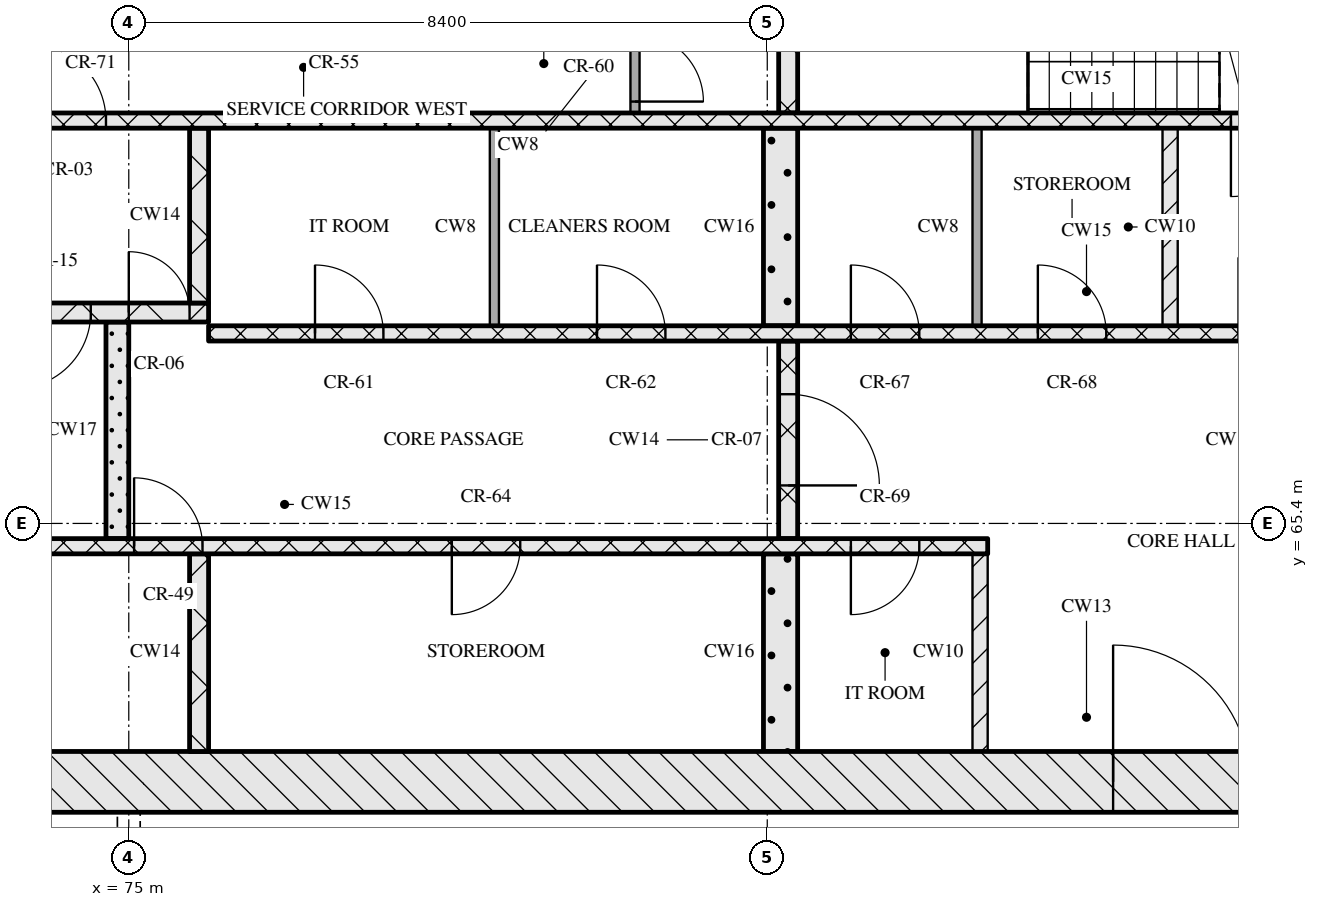
"""IFC4 building model, lengths in metres.
Left out: names, types, materials, properties, quantities, classifications, styles, units other than length and angle.
Written with IfcOpenShell. Run it as: python <this file> out.ifc"""

import sys

from ifc_helpers import new_model, si_unit, direction, frame, frame_2d, origin, place, context, subcontext, project, spatial, rectangle, extrude, element, fill, save


model = new_model("IFC4")
c1 = context("Model", 3, precision=1e-05, world=origin(), true_north=direction((0.0, 1.0)))
c2 = subcontext(c1, "Body", "Model", "MODEL_VIEW")
j1 = project(units=[si_unit("LENGTHUNIT", "METRE"), si_unit("PLANEANGLEUNIT", "RADIAN")], contexts=[c1])
p1 = place(None, origin())
s1 = spatial("IfcSite", under=j1, at=p1, CompositionType="ELEMENT")
p2 = place(p1, origin())
s2 = spatial("IfcBuilding", under=s1, at=p2, CompositionType="ELEMENT")
p3 = place(p2, frame((0.0, 0.0, 151.05)))
s3 = spatial("IfcBuildingStorey", under=s2, at=p3, CompositionType="ELEMENT", Elevation=151.05)
p4 = place(p3, frame((67.0, 62.0, 0.0), z_axis=(0.0, 0.0, 1.0), x_axis=(1.0, 0.0, 0.0)))
e1 = element("IfcWall", 1, at=p4, inside=s3, PredefinedType="SOLIDWALL", context=c2, shape_type="SweptSolid", body=[
    extrude(rectangle(XDim=41.2, YDim=0.8, at=frame_2d((20.6, 0.0))), origin(), (0.0, 0.0, 1.0), 3.32),
])
p5 = place(p4, frame((20.95, 0.0, 0.0)))
e2 = element("IfcOpeningElement", 2, at=p5, cuts=e1, PredefinedType="OPENING", context=c2, shape_type="SweptSolid", body=[
    extrude(rectangle(XDim=1.8, YDim=2.1, at=frame_2d((0.9, 1.05))), frame((0.0, 0.41, 0.0), z_axis=(0.0, -1.0, 0.0), x_axis=(1.0, 0.0, 0.0)), (0.0, 0.0, 1.0), 0.82),
])
p6 = place(p3, frame((75.925, 62.4, 0.0), z_axis=(0.0, 0.0, 1.0), x_axis=(0.0, 1.0, 0.0)))
e3 = element("IfcWall", 3, at=p6, inside=s3, PredefinedType="SOLIDWALL", context=c2, shape_type="SweptSolid", body=[
    extrude(rectangle(XDim=2.6, YDim=0.25, at=frame_2d((1.3, 0.0))), origin(), (0.0, 0.0, 1.0), 3.32),
])
p7 = place(p3, frame((83.575, 62.4, 0.0), z_axis=(0.0, 0.0, 1.0), x_axis=(0.0, 1.0, 0.0)))
e4 = element("IfcWall", 4, at=p7, inside=s3, PredefinedType="SOLIDWALL", context=c2, shape_type="SweptSolid", body=[
    extrude(rectangle(XDim=2.6, YDim=0.45, at=frame_2d((1.3, 0.0))), origin(), (0.0, 0.0, 1.0), 3.32),
])
p8 = place(p3, frame((86.2, 62.4, 0.0), z_axis=(0.0, 0.0, 1.0), x_axis=(0.0, 1.0, 0.0)))
e5 = element("IfcWall", 5, at=p8, inside=s3, PredefinedType="PARTITIONING", context=c2, shape_type="SweptSolid", body=[
    extrude(rectangle(XDim=2.6, YDim=0.2, at=frame_2d((1.3, 0.0))), origin(), (0.0, 0.0, 1.0), 3.32),
])
p9 = place(p3, frame((67.8, 65.1, 0.0), z_axis=(0.0, 0.0, 1.0), x_axis=(1.0, 0.0, 0.0)))
e6 = element("IfcWall", 6, at=p9, inside=s3, PredefinedType="SOLIDWALL", context=c2, shape_type="SweptSolid", body=[
    extrude(rectangle(XDim=18.5, YDim=0.2, at=frame_2d((9.25, 0.0))), origin(), (0.0, 0.0, 1.0), 3.32),
])
p10 = place(p9, frame((7.27, 0.0, 0.0)))
e7 = element("IfcOpeningElement", 7, at=p10, cuts=e6, PredefinedType="OPENING", context=c2, shape_type="SweptSolid", body=[
    extrude(rectangle(XDim=0.9, YDim=2.1, at=frame_2d((0.45, 1.05))), frame((0.0, 0.11, 0.0), z_axis=(0.0, -1.0, 0.0), x_axis=(1.0, 0.0, 0.0)), (0.0, 0.0, 1.0), 0.22),
])
p11 = place(p9, frame((11.45, 0.0, 0.0)))
e8 = element("IfcOpeningElement", 8, at=p11, cuts=e6, PredefinedType="OPENING", context=c2, shape_type="SweptSolid", body=[
    extrude(rectangle(XDim=0.9, YDim=2.1, at=frame_2d((0.45, 1.05))), frame((0.0, 0.11, 0.0), z_axis=(0.0, -1.0, 0.0), x_axis=(1.0, 0.0, 0.0)), (0.0, 0.0, 1.0), 0.22),
])
p12 = place(p9, frame((16.7, 0.0, 0.0)))
e9 = element("IfcOpeningElement", 9, at=p12, cuts=e6, PredefinedType="OPENING", context=c2, shape_type="SweptSolid", body=[
    extrude(rectangle(XDim=0.9, YDim=2.1, at=frame_2d((0.45, 1.05))), frame((0.0, 0.11, 0.0), z_axis=(0.0, -1.0, 0.0), x_axis=(1.0, 0.0, 0.0)), (0.0, 0.0, 1.0), 0.22),
])
p13 = place(p3, frame((74.85, 65.2, 0.0), z_axis=(0.0, 0.0, 1.0), x_axis=(0.0, 1.0, 0.0)))
e10 = element("IfcWall", 10, at=p13, inside=s3, PredefinedType="SOLIDWALL", context=c2, shape_type="SweptSolid", body=[
    extrude(rectangle(XDim=2.85, YDim=0.3, at=frame_2d((1.425, 0.0))), origin(), (0.0, 0.0, 1.0), 3.32),
])
p14 = place(p3, frame((83.675, 65.2, 0.0), z_axis=(0.0, 0.0, 1.0), x_axis=(0.0, 1.0, 0.0)))
e11 = element("IfcWall", 11, at=p14, inside=s3, PredefinedType="SOLIDWALL", context=c2, shape_type="SweptSolid", body=[
    extrude(rectangle(XDim=2.6, YDim=0.25, at=frame_2d((1.3, 0.0))), origin(), (0.0, 0.0, 1.0), 3.32),
])
p15 = place(p14, frame((0.7, 0.0, 0.0)))
e12 = element("IfcOpeningElement", 12, at=p15, cuts=e11, PredefinedType="OPENING", context=c2, shape_type="SweptSolid", body=[
    extrude(rectangle(XDim=1.2, YDim=2.1, at=frame_2d((0.6, 1.05))), frame((0.0, 0.135, 0.0), z_axis=(0.0, -1.0, 0.0), x_axis=(1.0, 0.0, 0.0)), (0.0, 0.0, 1.0), 0.27),
])
p16 = place(p3, frame((76.05, 67.9, 0.0), z_axis=(0.0, 0.0, 1.0), x_axis=(1.0, 0.0, 0.0)))
e13 = element("IfcWall", 13, at=p16, inside=s3, PredefinedType="SOLIDWALL", context=c2, shape_type="SweptSolid", body=[
    extrude(rectangle(XDim=23.1, YDim=0.2, at=frame_2d((11.55, 0.0))), origin(), (0.0, 0.0, 1.0), 3.32),
])
p17 = place(p16, frame((1.4, 0.0, 0.0)))
e14 = element("IfcOpeningElement", 14, at=p17, cuts=e13, PredefinedType="OPENING", context=c2, shape_type="SweptSolid", body=[
    extrude(rectangle(XDim=0.9, YDim=2.1, at=frame_2d((0.45, 1.05))), frame((0.0, 0.11, 0.0), z_axis=(0.0, -1.0, 0.0), x_axis=(1.0, 0.0, 0.0)), (0.0, 0.0, 1.0), 0.22),
])
p18 = place(p16, frame((5.11, 0.0, 0.0)))
e15 = element("IfcOpeningElement", 15, at=p18, cuts=e13, PredefinedType="OPENING", context=c2, shape_type="SweptSolid", body=[
    extrude(rectangle(XDim=0.9, YDim=2.1, at=frame_2d((0.45, 1.05))), frame((0.0, 0.11, 0.0), z_axis=(0.0, -1.0, 0.0), x_axis=(1.0, 0.0, 0.0)), (0.0, 0.0, 1.0), 0.22),
])
p19 = place(p16, frame((8.45, 0.0, 0.0)))
e16 = element("IfcOpeningElement", 16, at=p19, cuts=e13, PredefinedType="OPENING", context=c2, shape_type="SweptSolid", body=[
    extrude(rectangle(XDim=0.9, YDim=2.1, at=frame_2d((0.45, 1.05))), frame((0.0, 0.11, 0.0), z_axis=(0.0, -1.0, 0.0), x_axis=(1.0, 0.0, 0.0)), (0.0, 0.0, 1.0), 0.22),
])
p20 = place(p16, frame((10.91, 0.0, 0.0)))
e17 = element("IfcOpeningElement", 17, at=p20, cuts=e13, PredefinedType="OPENING", context=c2, shape_type="SweptSolid", body=[
    extrude(rectangle(XDim=0.9, YDim=2.1, at=frame_2d((0.45, 1.05))), frame((0.0, 0.11, 0.0), z_axis=(0.0, -1.0, 0.0), x_axis=(1.0, 0.0, 0.0)), (0.0, 0.0, 1.0), 0.22),
])
p21 = place(p16, frame((13.55, 0.0, 0.0)))
e18 = element("IfcOpeningElement", 18, at=p21, cuts=e13, PredefinedType="OPENING", context=c2, shape_type="SweptSolid", body=[
    extrude(rectangle(XDim=1.0, YDim=2.1, at=frame_2d((0.5, 1.05))), frame((0.0, 0.11, 0.0), z_axis=(0.0, -1.0, 0.0), x_axis=(1.0, 0.0, 0.0)), (0.0, 0.0, 1.0), 0.22),
])
p22 = place(p16, frame((16.2, 0.0, 0.0)))
e19 = element("IfcOpeningElement", 19, at=p22, cuts=e13, PredefinedType="OPENING", context=c2, shape_type="SweptSolid", body=[
    extrude(rectangle(XDim=1.1, YDim=2.1, at=frame_2d((0.55, 1.05))), frame((0.0, 0.11, 0.0), z_axis=(0.0, -1.0, 0.0), x_axis=(1.0, 0.0, 0.0)), (0.0, 0.0, 1.0), 0.22),
])
p23 = place(p16, frame((18.7, 0.0, 0.0)))
e20 = element("IfcOpeningElement", 20, at=p23, cuts=e13, PredefinedType="OPENING", context=c2, shape_type="SweptSolid", body=[
    extrude(rectangle(XDim=1.1, YDim=2.1, at=frame_2d((0.55, 1.05))), frame((0.0, 0.11, 0.0), z_axis=(0.0, -1.0, 0.0), x_axis=(1.0, 0.0, 0.0)), (0.0, 0.0, 1.0), 0.22),
])
p24 = place(p16, frame((21.2, 0.0, 0.0)))
e21 = element("IfcOpeningElement", 21, at=p24, cuts=e13, PredefinedType="OPENING", context=c2, shape_type="SweptSolid", body=[
    extrude(rectangle(XDim=1.1, YDim=2.1, at=frame_2d((0.55, 1.05))), frame((0.0, 0.11, 0.0), z_axis=(0.0, -1.0, 0.0), x_axis=(1.0, 0.0, 0.0)), (0.0, 0.0, 1.0), 0.22),
])
p25 = place(p3, frame((79.81, 68.0, 0.0), z_axis=(0.0, 0.0, 1.0), x_axis=(0.0, 1.0, 0.0)))
e22 = element("IfcWall", 22, at=p25, inside=s3, PredefinedType="PARTITIONING", context=c2, shape_type="SweptSolid", body=[
    extrude(rectangle(XDim=2.6, YDim=0.12, at=frame_2d((1.3, 0.0))), origin(), (0.0, 0.0, 1.0), 3.32),
])
p26 = place(p3, frame((83.575, 68.0, 0.0), z_axis=(0.0, 0.0, 1.0), x_axis=(0.0, 1.0, 0.0)))
e23 = element("IfcWall", 23, at=p26, inside=s3, PredefinedType="SOLIDWALL", context=c2, shape_type="SweptSolid", body=[
    extrude(rectangle(XDim=2.6, YDim=0.45, at=frame_2d((1.3, 0.0))), origin(), (0.0, 0.0, 1.0), 3.32),
])
p27 = place(p3, frame((86.16, 68.0, 0.0), z_axis=(0.0, 0.0, 1.0), x_axis=(0.0, 1.0, 0.0)))
e24 = element("IfcWall", 24, at=p27, inside=s3, PredefinedType="PARTITIONING", context=c2, shape_type="SweptSolid", body=[
    extrude(rectangle(XDim=2.6, YDim=0.12, at=frame_2d((1.3, 0.0))), origin(), (0.0, 0.0, 1.0), 3.32),
])
p28 = place(p3, frame((88.7, 68.0, 0.0), z_axis=(0.0, 0.0, 1.0), x_axis=(0.0, 1.0, 0.0)))
e25 = element("IfcWall", 25, at=p28, inside=s3, PredefinedType="PARTITIONING", context=c2, shape_type="SweptSolid", body=[
    extrude(rectangle(XDim=2.6, YDim=0.2, at=frame_2d((1.3, 0.0))), origin(), (0.0, 0.0, 1.0), 3.32),
])
p29 = place(p3, frame((67.8, 68.175, 0.0), z_axis=(0.0, 0.0, 1.0), x_axis=(1.0, 0.0, 0.0)))
e26 = element("IfcWall", 26, at=p29, inside=s3, PredefinedType="SOLIDWALL", context=c2, shape_type="SweptSolid", body=[
    extrude(rectangle(XDim=8.25, YDim=0.25, at=frame_2d((4.125, 0.0))), origin(), (0.0, 0.0, 1.0), 3.32),
])
p30 = place(p29, frame((5.7, 0.0, 0.0)))
e27 = element("IfcOpeningElement", 27, at=p30, cuts=e26, PredefinedType="OPENING", context=c2, shape_type="SweptSolid", body=[
    extrude(rectangle(XDim=1.0, YDim=2.1, at=frame_2d((0.5, 1.05))), frame((0.0, 0.135, 0.0), z_axis=(0.0, -1.0, 0.0), x_axis=(1.0, 0.0, 0.0)), (0.0, 0.0, 1.0), 0.27),
])
p31 = place(p29, frame((7.2, 0.0, 0.0)))
e28 = element("IfcOpeningElement", 28, at=p31, cuts=e26, PredefinedType="OPENING", context=c2, shape_type="SweptSolid", body=[
    extrude(rectangle(XDim=0.8, YDim=2.1, at=frame_2d((0.4, 1.05))), frame((0.0, 0.135, 0.0), z_axis=(0.0, -1.0, 0.0), x_axis=(1.0, 0.0, 0.0)), (0.0, 0.0, 1.0), 0.27),
])
p32 = place(p3, frame((75.925, 68.3, 0.0), z_axis=(0.0, 0.0, 1.0), x_axis=(0.0, 1.0, 0.0)))
e29 = element("IfcWall", 29, at=p32, inside=s3, PredefinedType="SOLIDWALL", context=c2, shape_type="SweptSolid", body=[
    extrude(rectangle(XDim=2.3, YDim=0.25, at=frame_2d((1.15, 0.0))), origin(), (0.0, 0.0, 1.0), 3.32),
])
p33 = place(p3, frame((67.8, 70.7, 0.0), z_axis=(0.0, 0.0, 1.0), x_axis=(1.0, 0.0, 0.0)))
e30 = element("IfcWall", 30, at=p33, inside=s3, PredefinedType="SOLIDWALL", context=c2, shape_type="SweptSolid", body=[
    extrude(rectangle(XDim=39.6, YDim=0.2, at=frame_2d((19.8, 0.0))), origin(), (0.0, 0.0, 1.0), 3.32),
])
p34 = place(p33, frame((0.65, 0.0, 0.0)))
e31 = element("IfcOpeningElement", 31, at=p34, cuts=e30, PredefinedType="OPENING", context=c2, shape_type="SweptSolid", body=[
    extrude(rectangle(XDim=1.1, YDim=2.1, at=frame_2d((0.55, 1.05))), frame((0.0, 0.11, 0.0), z_axis=(0.0, -1.0, 0.0), x_axis=(1.0, 0.0, 0.0)), (0.0, 0.0, 1.0), 0.22),
])
p35 = place(p33, frame((3.25, 0.0, 0.0)))
e32 = element("IfcOpeningElement", 32, at=p35, cuts=e30, PredefinedType="OPENING", context=c2, shape_type="SweptSolid", body=[
    extrude(rectangle(XDim=1.1, YDim=2.1, at=frame_2d((0.55, 1.05))), frame((0.0, 0.11, 0.0), z_axis=(0.0, -1.0, 0.0), x_axis=(1.0, 0.0, 0.0)), (0.0, 0.0, 1.0), 0.22),
])
p36 = place(p33, frame((5.9, 0.0, 0.0)))
e33 = element("IfcOpeningElement", 33, at=p36, cuts=e30, PredefinedType="OPENING", context=c2, shape_type="SweptSolid", body=[
    extrude(rectangle(XDim=1.0, YDim=2.1, at=frame_2d((0.5, 1.05))), frame((0.0, 0.11, 0.0), z_axis=(0.0, -1.0, 0.0), x_axis=(1.0, 0.0, 0.0)), (0.0, 0.0, 1.0), 0.22),
])
p37 = place(p33, frame((21.7, 0.0, 0.0)))
e34 = element("IfcOpeningElement", 34, at=p37, cuts=e30, PredefinedType="OPENING", context=c2, shape_type="SweptSolid", body=[
    extrude(rectangle(XDim=1.0, YDim=2.1, at=frame_2d((0.5, 1.05))), frame((0.0, 0.11, 0.0), z_axis=(0.0, -1.0, 0.0), x_axis=(1.0, 0.0, 0.0)), (0.0, 0.0, 1.0), 0.22),
])
p38 = place(p33, frame((32.7, 0.0, 0.0)))
e35 = element("IfcOpeningElement", 35, at=p38, cuts=e30, PredefinedType="OPENING", context=c2, shape_type="SweptSolid", body=[
    extrude(rectangle(XDim=1.0, YDim=2.1, at=frame_2d((0.5, 1.05))), frame((0.0, 0.11, 0.0), z_axis=(0.0, -1.0, 0.0), x_axis=(1.0, 0.0, 0.0)), (0.0, 0.0, 1.0), 0.22),
])
p39 = place(p33, frame((35.25, 0.0, 0.0)))
e36 = element("IfcOpeningElement", 36, at=p39, cuts=e30, PredefinedType="OPENING", context=c2, shape_type="SweptSolid", body=[
    extrude(rectangle(XDim=1.1, YDim=2.1, at=frame_2d((0.55, 1.05))), frame((0.0, 0.11, 0.0), z_axis=(0.0, -1.0, 0.0), x_axis=(1.0, 0.0, 0.0)), (0.0, 0.0, 1.0), 0.22),
])
p40 = place(p33, frame((37.85, 0.0, 0.0)))
e37 = element("IfcOpeningElement", 37, at=p40, cuts=e30, PredefinedType="OPENING", context=c2, shape_type="SweptSolid", body=[
    extrude(rectangle(XDim=1.1, YDim=2.1, at=frame_2d((0.55, 1.05))), frame((0.0, 0.11, 0.0), z_axis=(0.0, -1.0, 0.0), x_axis=(1.0, 0.0, 0.0)), (0.0, 0.0, 1.0), 0.22),
])
p41 = place(p3, frame((81.66, 70.8, 0.0), z_axis=(0.0, 0.0, 1.0), x_axis=(0.0, 1.0, 0.0)))
e38 = element("IfcWall", 38, at=p41, inside=s3, PredefinedType="PARTITIONING", context=c2, shape_type="SweptSolid", body=[
    extrude(rectangle(XDim=1.2, YDim=0.12, at=frame_2d((0.6, 0.0))), origin(), (0.0, 0.0, 1.0), 3.32),
])
p42 = place(p41, frame((0.15, 0.0, 0.0)))
e39 = element("IfcOpeningElement", 39, at=p42, cuts=e38, PredefinedType="OPENING", context=c2, shape_type="SweptSolid", body=[
    extrude(rectangle(XDim=0.9, YDim=2.1, at=frame_2d((0.45, 1.05))), frame((0.0, 0.07, 0.0), z_axis=(0.0, -1.0, 0.0), x_axis=(1.0, 0.0, 0.0)), (0.0, 0.0, 1.0), 0.14),
])
p43 = place(p3, frame((83.675, 70.8, 0.0), z_axis=(0.0, 0.0, 1.0), x_axis=(0.0, 1.0, 0.0)))
e40 = element("IfcWall", 40, at=p43, inside=s3, PredefinedType="SOLIDWALL", context=c2, shape_type="SweptSolid", body=[
    extrude(rectangle(XDim=2.95, YDim=0.25, at=frame_2d((1.475, 0.0))), origin(), (0.0, 0.0, 1.0), 3.32),
])
p44 = place(p5, origin())
e41 = element("IfcDoor", 41, at=p44, inside=s3, OperationType="DOUBLE_DOOR_SINGLE_SWING", PredefinedType="DOOR", context=c2, shape_type="SweptSolid", body=[
    extrude(rectangle(XDim=1.8, YDim=2.1, at=frame_2d((0.9, 1.05))), frame((0.0, 0.025, 0.0), z_axis=(0.0, -1.0, 0.0), x_axis=(1.0, 0.0, 0.0)), (0.0, 0.0, 1.0), 0.05),
])
fill(e2, e41)
p45 = place(p10, origin())
e42 = element("IfcDoor", 42, at=p45, inside=s3, OperationType="SINGLE_SWING_LEFT", PredefinedType="DOOR", context=c2, shape_type="SweptSolid", body=[
    extrude(rectangle(XDim=0.9, YDim=2.1, at=frame_2d((0.45, 1.05))), frame((0.0, 0.025, 0.0), z_axis=(0.0, -1.0, 0.0), x_axis=(1.0, 0.0, 0.0)), (0.0, 0.0, 1.0), 0.05),
])
fill(e7, e42)
p46 = place(p11, origin())
e43 = element("IfcDoor", 43, at=p46, inside=s3, OperationType="SINGLE_SWING_RIGHT", PredefinedType="DOOR", context=c2, shape_type="SweptSolid", body=[
    extrude(rectangle(XDim=0.9, YDim=2.1, at=frame_2d((0.45, 1.05))), frame((0.0, 0.025, 0.0), z_axis=(0.0, -1.0, 0.0), x_axis=(1.0, 0.0, 0.0)), (0.0, 0.0, 1.0), 0.05),
])
fill(e8, e43)
p47 = place(p12, origin())
e44 = element("IfcDoor", 44, at=p47, inside=s3, OperationType="SINGLE_SWING_RIGHT", PredefinedType="DOOR", context=c2, shape_type="SweptSolid", body=[
    extrude(rectangle(XDim=0.9, YDim=2.1, at=frame_2d((0.45, 1.05))), frame((0.0, 0.025, 0.0), z_axis=(0.0, -1.0, 0.0), x_axis=(1.0, 0.0, 0.0)), (0.0, 0.0, 1.0), 0.05),
])
fill(e9, e44)
p48 = place(p15, origin())
e45 = element("IfcDoor", 45, at=p48, inside=s3, OperationType="SINGLE_SWING_RIGHT", PredefinedType="DOOR", context=c2, shape_type="SweptSolid", body=[
    extrude(rectangle(XDim=1.2, YDim=2.1, at=frame_2d((0.6, 1.05))), frame((0.0, 0.025, 0.0), z_axis=(0.0, -1.0, 0.0), x_axis=(1.0, 0.0, 0.0)), (0.0, 0.0, 1.0), 0.05),
])
fill(e12, e45)
p49 = place(p17, origin())
e46 = element("IfcDoor", 46, at=p49, inside=s3, OperationType="SINGLE_SWING_LEFT", PredefinedType="DOOR", context=c2, shape_type="SweptSolid", body=[
    extrude(rectangle(XDim=0.9, YDim=2.1, at=frame_2d((0.45, 1.05))), frame((0.0, 0.025, 0.0), z_axis=(0.0, -1.0, 0.0), x_axis=(1.0, 0.0, 0.0)), (0.0, 0.0, 1.0), 0.05),
])
fill(e14, e46)
p50 = place(p18, origin())
e47 = element("IfcDoor", 47, at=p50, inside=s3, OperationType="SINGLE_SWING_LEFT", PredefinedType="DOOR", context=c2, shape_type="SweptSolid", body=[
    extrude(rectangle(XDim=0.9, YDim=2.1, at=frame_2d((0.45, 1.05))), frame((0.0, 0.025, 0.0), z_axis=(0.0, -1.0, 0.0), x_axis=(1.0, 0.0, 0.0)), (0.0, 0.0, 1.0), 0.05),
])
fill(e15, e47)
p51 = place(p19, origin())
e48 = element("IfcDoor", 48, at=p51, inside=s3, OperationType="SINGLE_SWING_LEFT", PredefinedType="DOOR", context=c2, shape_type="SweptSolid", body=[
    extrude(rectangle(XDim=0.9, YDim=2.1, at=frame_2d((0.45, 1.05))), frame((0.0, 0.025, 0.0), z_axis=(0.0, -1.0, 0.0), x_axis=(1.0, 0.0, 0.0)), (0.0, 0.0, 1.0), 0.05),
])
fill(e16, e48)
p52 = place(p20, origin())
e49 = element("IfcDoor", 49, at=p52, inside=s3, OperationType="SINGLE_SWING_LEFT", PredefinedType="DOOR", context=c2, shape_type="SweptSolid", body=[
    extrude(rectangle(XDim=0.9, YDim=2.1, at=frame_2d((0.45, 1.05))), frame((0.0, 0.025, 0.0), z_axis=(0.0, -1.0, 0.0), x_axis=(1.0, 0.0, 0.0)), (0.0, 0.0, 1.0), 0.05),
])
fill(e17, e49)
p53 = place(p30, origin())
e50 = element("IfcDoor", 50, at=p53, inside=s3, OperationType="SINGLE_SWING_RIGHT", PredefinedType="DOOR", context=c2, shape_type="SweptSolid", body=[
    extrude(rectangle(XDim=1.0, YDim=2.1, at=frame_2d((0.5, 1.05))), frame((0.0, 0.025, 0.0), z_axis=(0.0, -1.0, 0.0), x_axis=(1.0, 0.0, 0.0)), (0.0, 0.0, 1.0), 0.05),
])
fill(e27, e50)
p54 = place(p31, origin())
e51 = element("IfcDoor", 51, at=p54, inside=s3, OperationType="SINGLE_SWING_LEFT", PredefinedType="DOOR", context=c2, shape_type="SweptSolid", body=[
    extrude(rectangle(XDim=0.8, YDim=2.1, at=frame_2d((0.4, 1.05))), frame((0.0, 0.025, 0.0), z_axis=(0.0, -1.0, 0.0), x_axis=(1.0, 0.0, 0.0)), (0.0, 0.0, 1.0), 0.05),
])
fill(e28, e51)
p55 = place(p36, origin())
e52 = element("IfcDoor", 52, at=p55, inside=s3, OperationType="SINGLE_SWING_LEFT", PredefinedType="DOOR", context=c2, shape_type="SweptSolid", body=[
    extrude(rectangle(XDim=1.0, YDim=2.1, at=frame_2d((0.5, 1.05))), frame((0.0, 0.025, 0.0), z_axis=(0.0, -1.0, 0.0), x_axis=(1.0, 0.0, 0.0)), (0.0, 0.0, 1.0), 0.05),
])
fill(e33, e52)
p56 = place(p37, origin())
e53 = element("IfcDoor", 53, at=p56, inside=s3, OperationType="SINGLE_SWING_RIGHT", PredefinedType="DOOR", context=c2, shape_type="SweptSolid", body=[
    extrude(rectangle(XDim=1.0, YDim=2.1, at=frame_2d((0.5, 1.05))), frame((0.0, 0.025, 0.0), z_axis=(0.0, -1.0, 0.0), x_axis=(1.0, 0.0, 0.0)), (0.0, 0.0, 1.0), 0.05),
])
fill(e34, e53)
p57 = place(p42, origin())
e54 = element("IfcDoor", 54, at=p57, inside=s3, OperationType="SINGLE_SWING_RIGHT", PredefinedType="DOOR", context=c2, shape_type="SweptSolid", body=[
    extrude(rectangle(XDim=0.9, YDim=2.1, at=frame_2d((0.45, 1.05))), frame((0.0, 0.025, 0.0), z_axis=(0.0, -1.0, 0.0), x_axis=(1.0, 0.0, 0.0)), (0.0, 0.0, 1.0), 0.05),
])
fill(e39, e54)
save(model, sys.argv[1])
